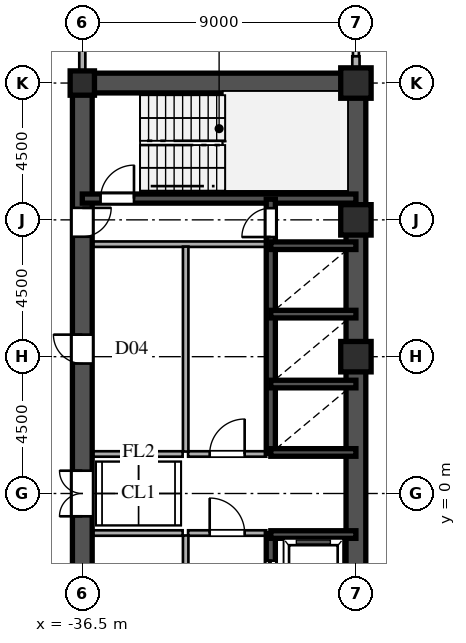
"""IFC4 building model, lengths in metres.
Left out: names, types, materials, properties, quantities, classifications, styles, units other than length and angle.
Written with IfcOpenShell. Run it as: python <this file> out.ifc"""

import sys

from ifc_helpers import new_model, si_unit, direction, frame, frame_2d, origin, origin_2d, place, context, subcontext, project, spatial, rectangle, hollow_rectangle, i_section, extrude, source, transform, mapped, element, fill, save


model = new_model("IFC4")
c1 = context("Model", 3, precision=1e-05, world=origin(), true_north=direction((0.0, 1.0)))
c2 = subcontext(c1, "Body", "Model", "MODEL_VIEW")
j1 = project(units=[si_unit("LENGTHUNIT", "METRE"), si_unit("PLANEANGLEUNIT", "RADIAN")], contexts=[c1])
p1 = place(None, origin())
s1 = spatial("IfcSite", under=j1, at=p1, CompositionType="ELEMENT")
p2 = place(p1, origin())
s2 = spatial("IfcBuilding", under=s1, at=p2, CompositionType="ELEMENT")
p3 = place(p2, frame((0.0, 0.0, 65.7)))
s3 = spatial("IfcBuildingStorey", under=s2, at=p3, CompositionType="ELEMENT", Elevation=65.7)
m1 = source(origin(), c2, "Body", "SweptSolid", [
    extrude(hollow_rectangle(XDim=1.0, YDim=1.0, WallThickness=0.042, at=origin_2d()), origin(), (0.0, 0.0, 1.0), 3.6),
])
for number, where, z_axis, x_axis in (
    (1, (-27.5, 4.5, 0.0), (0.0, 0.0, 1.0), (1.0, 0.0, 0.0)),
    (2, (-27.5, 9.0, 0.0), (0.0, 0.0, 1.0), (1.0, 0.0, 0.0)),
    (3, (-27.5, 13.5, 0.0), (0.0, 0.0, 1.0), (1.0, 0.0, 0.0)),
):
    element("IfcColumn", number, at=place(p3, frame(where, z_axis=z_axis, x_axis=x_axis)), inside=s3, PredefinedType="COLUMN", context=c2, shape_type="MappedRepresentation", body=[
        mapped(m1, transform((0.0, 0.0, 0.0), scale=1.0)),
    ])
m2 = source(origin(), c2, "Body", "SweptSolid", [
    extrude(i_section(OverallWidth=0.8, OverallDepth=0.8, WebThickness=0.032, FlangeThickness=0.05, at=origin_2d()), origin(), (0.0, 0.0, 1.0), 3.6),
])
p4 = place(p3, frame((-36.5, 13.5, 0.0), z_axis=(0.0, 0.0, 1.0), x_axis=(1.0, 0.0, 0.0)))
e4 = element("IfcColumn", 4, at=p4, inside=s3, PredefinedType="COLUMN", context=c2, shape_type="MappedRepresentation", body=[
    mapped(m2, transform((0.0, 0.0, 0.0), scale=1.0)),
])
p5 = place(p3, frame((-27.5, 13.83, 0.0), z_axis=(0.0, 0.0, 1.0), x_axis=(0.0, 1.0, 0.0)))
e5 = element("IfcWall", 5, at=p5, inside=s3, PredefinedType="SOLIDWALL", context=c2, shape_type="SweptSolid", body=[
    extrude(rectangle(XDim=0.55, YDim=0.24, at=frame_2d((0.275, 0.0))), origin(), (0.0, 0.0, 1.0), 2.88),
])
for number, where, z_axis, x_axis in (
    (6, (-27.5, -13.5, 0.0), (0.0, 0.0, 1.0), (0.0, 1.0, 0.0)),
    (7, (-27.5, 1.3, 0.0), (0.0, 0.0, 1.0), (0.0, 1.0, 0.0)),
):
    element("IfcWall", number, at=place(p3, frame(where, z_axis=z_axis, x_axis=x_axis)), inside=s3, PredefinedType="SHEAR", context=c2, shape_type="SweptSolid", body=[
        extrude(rectangle(XDim=12.2, YDim=0.65, at=frame_2d((6.1, 0.0))), origin(), (0.0, 0.0, 1.0), 3.38),
    ])
p6 = place(p3, frame((-27.5, -1.3, 0.0), z_axis=(0.0, 0.0, 1.0), x_axis=(0.0, 1.0, 0.0)))
e8 = element("IfcWall", 8, at=p6, inside=s3, PredefinedType="SHEAR", context=c2, shape_type="SweptSolid", body=[
    extrude(rectangle(XDim=2.6, YDim=0.65, at=frame_2d((1.3, 0.0))), origin(), (0.0, 0.0, 1.0), 3.38),
])
p7 = place(p3, frame((-36.5, 13.5, 0.0), z_axis=(0.0, 0.0, 1.0), x_axis=(1.0, 0.0, 0.0)))
e9 = element("IfcWall", 9, at=p7, inside=s3, PredefinedType="SHEAR", context=c2, shape_type="SweptSolid", body=[
    extrude(rectangle(XDim=9.0, YDim=0.65, at=frame_2d((4.5, 0.0))), origin(), (0.0, 0.0, 1.0), 3.38),
])
p8 = place(p3, frame((-36.5, -1.3, 0.0), z_axis=(0.0, 0.0, 1.0), x_axis=(0.0, 1.0, 0.0)))
e10 = element("IfcWall", 10, at=p8, inside=s3, PredefinedType="SHEAR", context=c2, shape_type="SweptSolid", body=[
    extrude(rectangle(XDim=2.6, YDim=0.65, at=frame_2d((1.3, 0.0))), origin(), (0.0, 0.0, 1.0), 3.38),
])
p9 = place(p8, frame((0.55, 0.0, 0.0)))
e11 = element("IfcOpeningElement", 11, at=p9, cuts=e10, PredefinedType="OPENING", context=c2, shape_type="SweptSolid", body=[
    extrude(rectangle(XDim=1.5, YDim=2.3, at=frame_2d((0.75, 1.15))), frame((0.0, 0.335, 0.0), z_axis=(0.0, -1.0, 0.0), x_axis=(1.0, 0.0, 0.0)), (0.0, 0.0, 1.0), 0.67),
])
p10 = place(p3, frame((-36.5, 8.2, 0.0), z_axis=(0.0, 0.0, 1.0), x_axis=(0.0, 1.0, 0.0)))
e12 = element("IfcWall", 12, at=p10, inside=s3, PredefinedType="SHEAR", context=c2, shape_type="SweptSolid", body=[
    extrude(rectangle(XDim=5.45, YDim=0.65, at=frame_2d((2.725, 0.0))), origin(), (0.0, 0.0, 1.0), 3.38),
])
p11 = place(p10, frame((0.245, 0.0, 0.0)))
e13 = element("IfcOpeningElement", 13, at=p11, cuts=e12, PredefinedType="OPENING", context=c2, shape_type="SweptSolid", body=[
    extrude(rectangle(XDim=0.95, YDim=2.15, at=frame_2d((0.475, 1.075))), frame((0.0, 0.335, 0.0), z_axis=(0.0, -1.0, 0.0), x_axis=(1.0, 0.0, 0.0)), (0.0, 0.0, 1.0), 0.67),
])
p12 = place(p3, frame((-36.5, -6.5, 0.0), z_axis=(0.0, 0.0, 1.0), x_axis=(0.0, 1.0, 0.0)))
e14 = element("IfcWall", 14, at=p12, inside=s3, PredefinedType="SHEAR", context=c2, shape_type="SweptSolid", body=[
    extrude(rectangle(XDim=5.2, YDim=0.65, at=frame_2d((2.6, 0.0))), origin(), (0.0, 0.0, 1.0), 3.38),
])
p13 = place(p12, frame((2.125, 0.0, 0.0)))
e15 = element("IfcOpeningElement", 15, at=p13, cuts=e14, PredefinedType="OPENING", context=c2, shape_type="SweptSolid", body=[
    extrude(rectangle(XDim=0.95, YDim=2.15, at=frame_2d((0.475, 1.075))), frame((0.0, 0.335, 0.0), z_axis=(0.0, -1.0, 0.0), x_axis=(1.0, 0.0, 0.0)), (0.0, 0.0, 1.0), 0.67),
])
p14 = place(p3, frame((-36.5, 1.3, 0.0), z_axis=(0.0, 0.0, 1.0), x_axis=(0.0, 1.0, 0.0)))
e16 = element("IfcWall", 16, at=p14, inside=s3, PredefinedType="SHEAR", context=c2, shape_type="SweptSolid", body=[
    extrude(rectangle(XDim=6.9, YDim=0.65, at=frame_2d((3.45, 0.0))), origin(), (0.0, 0.0, 1.0), 3.38),
])
p15 = place(p14, frame((2.975, 0.0, 0.0)))
e17 = element("IfcOpeningElement", 17, at=p15, cuts=e16, PredefinedType="OPENING", context=c2, shape_type="SweptSolid", body=[
    extrude(rectangle(XDim=0.95, YDim=2.15, at=frame_2d((0.475, 1.075))), frame((0.0, 0.335, 0.0), z_axis=(0.0, -1.0, 0.0), x_axis=(1.0, 0.0, 0.0)), (0.0, 0.0, 1.0), 0.67),
])
p16 = place(p3, frame((-36.5, 9.7, 0.0), z_axis=(0.0, 0.0, 1.0), x_axis=(1.0, 0.0, 0.0)))
e18 = element("IfcWall", 18, at=p16, inside=s3, PredefinedType="SHEAR", context=c2, shape_type="SweptSolid", body=[
    extrude(rectangle(XDim=9.0, YDim=0.3, at=frame_2d((4.5, 0.0))), origin(), (0.0, 0.0, 1.0), 3.38),
])
p17 = place(p16, frame((0.6, 0.0, 0.0)))
e19 = element("IfcOpeningElement", 19, at=p17, cuts=e18, PredefinedType="OPENING", context=c2, shape_type="SweptSolid", body=[
    extrude(rectangle(XDim=1.1, YDim=2.2, at=frame_2d((0.55, 1.1))), frame((0.0, 0.16, 0.0), z_axis=(0.0, -1.0, 0.0), x_axis=(1.0, 0.0, 0.0)), (0.0, 0.0, 1.0), 0.32),
])
for number, where, z_axis, x_axis in (
    (20, (-30.3, -1.35, 0.0), (0.0, 0.0, 1.0), (1.0, 0.0, 0.0)),
    (21, (-30.3, 1.35, 0.0), (0.0, 0.0, 1.0), (1.0, 0.0, 0.0)),
    (22, (-30.3, 3.6, 0.0), (0.0, 0.0, 1.0), (1.0, 0.0, 0.0)),
    (23, (-30.3, 5.9, 0.0), (0.0, 0.0, 1.0), (1.0, 0.0, 0.0)),
    (24, (-30.3, 8.15, 0.0), (0.0, 0.0, 1.0), (1.0, 0.0, 0.0)),
):
    element("IfcWall", number, at=place(p3, frame(where, z_axis=z_axis, x_axis=x_axis)), inside=s3, PredefinedType="SHEAR", context=c2, shape_type="SweptSolid", body=[
        extrude(rectangle(XDim=2.8, YDim=0.25, at=frame_2d((1.4, 0.0))), origin(), (0.0, 0.0, 1.0), 3.38),
    ])
p18 = place(p3, frame((-30.3, -4.2, 0.0), z_axis=(0.0, 0.0, 1.0), x_axis=(0.0, 1.0, 0.0)))
e25 = element("IfcWall", 25, at=p18, inside=s3, PredefinedType="SHEAR", context=c2, shape_type="SweptSolid", body=[
    extrude(rectangle(XDim=2.88, YDim=0.3, at=frame_2d((1.44, 0.0))), origin(), (0.0, 0.0, 1.0), 3.38),
])
p19 = place(p18, frame((0.89, 0.0, 0.0)))
e26 = element("IfcOpeningElement", 26, at=p19, cuts=e25, PredefinedType="OPENING", context=c2, shape_type="SweptSolid", body=[
    extrude(rectangle(XDim=1.1, YDim=2.2, at=frame_2d((0.55, 1.1))), frame((0.0, 0.16, 0.0), z_axis=(0.0, -1.0, 0.0), x_axis=(1.0, 0.0, 0.0)), (0.0, 0.0, 1.0), 0.32),
])
p20 = place(p3, frame((-30.3, 1.32, 0.0), z_axis=(0.0, 0.0, 1.0), x_axis=(0.0, 1.0, 0.0)))
e27 = element("IfcWall", 27, at=p20, inside=s3, PredefinedType="SHEAR", context=c2, shape_type="SweptSolid", body=[
    extrude(rectangle(XDim=2.28, YDim=0.3, at=frame_2d((1.14, 0.0))), origin(), (0.0, 0.0, 1.0), 3.38),
])
p21 = place(p3, frame((-30.3, 3.6, 0.0), z_axis=(0.0, 0.0, 1.0), x_axis=(0.0, 1.0, 0.0)))
e28 = element("IfcWall", 28, at=p21, inside=s3, PredefinedType="SHEAR", context=c2, shape_type="SweptSolid", body=[
    extrude(rectangle(XDim=2.3, YDim=0.3, at=frame_2d((1.15, 0.0))), origin(), (0.0, 0.0, 1.0), 3.38),
])
p22 = place(p3, frame((-30.3, 5.9, 0.0), z_axis=(0.0, 0.0, 1.0), x_axis=(0.0, 1.0, 0.0)))
e29 = element("IfcWall", 29, at=p22, inside=s3, PredefinedType="SHEAR", context=c2, shape_type="SweptSolid", body=[
    extrude(rectangle(XDim=2.25, YDim=0.3, at=frame_2d((1.125, 0.0))), origin(), (0.0, 0.0, 1.0), 3.38),
])
p23 = place(p3, frame((-30.3, 8.15, 0.0), z_axis=(0.0, 0.0, 1.0), x_axis=(0.0, 1.0, 0.0)))
e30 = element("IfcWall", 30, at=p23, inside=s3, PredefinedType="SHEAR", context=c2, shape_type="SweptSolid", body=[
    extrude(rectangle(XDim=1.53, YDim=0.3, at=frame_2d((0.765, 0.0))), origin(), (0.0, 0.0, 1.0), 3.38),
])
p24 = place(p23, frame((0.285, 0.0, 0.0)))
e31 = element("IfcOpeningElement", 31, at=p24, cuts=e30, PredefinedType="OPENING", context=c2, shape_type="SweptSolid", body=[
    extrude(rectangle(XDim=0.95, YDim=2.15, at=frame_2d((0.475, 1.075))), frame((0.0, 0.16, 0.0), z_axis=(0.0, -1.0, 0.0), x_axis=(1.0, 0.0, 0.0)), (0.0, 0.0, 1.0), 0.32),
])
p25 = place(p3, frame((-36.15, 8.2, 0.0), z_axis=(0.0, 0.0, 1.0), x_axis=(1.0, 0.0, 0.0)))
e32 = element("IfcWall", 32, at=p25, inside=s3, PredefinedType="PARTITIONING", context=c2, shape_type="SweptSolid", body=[
    extrude(rectangle(XDim=5.7, YDim=0.18, at=frame_2d((2.85, 0.0))), origin(), (0.0, 0.0, 1.0), 3.38),
])
p26 = place(p3, frame((-33.1, -6.42, 0.0), z_axis=(0.0, 0.0, 1.0), x_axis=(0.0, 1.0, 0.0)))
e33 = element("IfcWall", 33, at=p26, inside=s3, PredefinedType="PARTITIONING", context=c2, shape_type="SweptSolid", body=[
    extrude(rectangle(XDim=5.04, YDim=0.18, at=frame_2d((2.52, 0.0))), origin(), (0.0, 0.0, 1.0), 3.38),
])
p27 = place(p3, frame((-33.1, 1.38, 0.0), z_axis=(0.0, 0.0, 1.0), x_axis=(0.0, 1.0, 0.0)))
e34 = element("IfcWall", 34, at=p27, inside=s3, PredefinedType="PARTITIONING", context=c2, shape_type="SweptSolid", body=[
    extrude(rectangle(XDim=6.74, YDim=0.18, at=frame_2d((3.37, 0.0))), origin(), (0.0, 0.0, 1.0), 3.38),
])
p28 = place(p3, frame((-33.02, -1.3, 0.0), z_axis=(0.0, 0.0, 1.0), x_axis=(1.0, 0.0, 0.0)))
e35 = element("IfcWall", 35, at=p28, inside=s3, PredefinedType="PARTITIONING", context=c2, shape_type="SweptSolid", body=[
    extrude(rectangle(XDim=2.57, YDim=0.18, at=frame_2d((1.285, 0.0))), origin(), (0.0, 0.0, 1.0), 3.38),
])
p29 = place(p28, frame((0.71, 0.0, 0.0)))
e36 = element("IfcOpeningElement", 36, at=p29, cuts=e35, PredefinedType="OPENING", context=c2, shape_type="SweptSolid", body=[
    extrude(rectangle(XDim=1.15, YDim=2.2, at=frame_2d((0.575, 1.1))), frame((0.0, 0.1, 0.0), z_axis=(0.0, -1.0, 0.0), x_axis=(1.0, 0.0, 0.0)), (0.0, 0.0, 1.0), 0.2),
])
p30 = place(p3, frame((-33.02, 1.3, 0.0), z_axis=(0.0, 0.0, 1.0), x_axis=(1.0, 0.0, 0.0)))
e37 = element("IfcWall", 37, at=p30, inside=s3, PredefinedType="PARTITIONING", context=c2, shape_type="SweptSolid", body=[
    extrude(rectangle(XDim=2.57, YDim=0.18, at=frame_2d((1.285, 0.0))), origin(), (0.0, 0.0, 1.0), 3.38),
])
p31 = place(p30, frame((0.71, 0.0, 0.0)))
e38 = element("IfcOpeningElement", 38, at=p31, cuts=e37, PredefinedType="OPENING", context=c2, shape_type="SweptSolid", body=[
    extrude(rectangle(XDim=1.15, YDim=2.2, at=frame_2d((0.575, 1.1))), frame((0.0, 0.1, 0.0), z_axis=(0.0, -1.0, 0.0), x_axis=(1.0, 0.0, 0.0)), (0.0, 0.0, 1.0), 0.2),
])
for number, where, z_axis, x_axis in (
    (39, (-36.15, -1.3, 0.0), (0.0, 0.0, 1.0), (1.0, 0.0, 0.0)),
    (40, (-36.15, 1.3, 0.0), (0.0, 0.0, 1.0), (1.0, 0.0, 0.0)),
):
    element("IfcWall", number, at=place(p3, frame(where, z_axis=z_axis, x_axis=x_axis)), inside=s3, PredefinedType="PARTITIONING", context=c2, shape_type="SweptSolid", body=[
        extrude(rectangle(XDim=2.95, YDim=0.18, at=frame_2d((1.475, 0.0))), origin(), (0.0, 0.0, 1.0), 3.38),
    ])
p32 = place(p3, frame((-36.5, 13.83, 0.0), z_axis=(0.0, 0.0, 1.0), x_axis=(0.0, 1.0, 0.0)))
e41 = element("IfcWall", 41, at=p32, inside=s3, PredefinedType="PARTITIONING", context=c2, shape_type="SweptSolid", body=[
    extrude(rectangle(XDim=1.685, YDim=0.2, at=frame_2d((0.842, 0.0))), origin(), (0.0, 0.0, 1.0), 2.68),
])
m3 = source(origin(), c2, "Body", "SweptSolid", [
    extrude(rectangle(XDim=1.5, YDim=2.3, at=frame_2d((0.75, 1.15))), frame((0.0, 0.025, 0.0), z_axis=(0.0, -1.0, 0.0), x_axis=(1.0, 0.0, 0.0)), (0.0, 0.0, 1.0), 0.05),
])
p33 = place(p9, origin())
e42 = element("IfcDoor", 42, at=p33, inside=s3, OperationType="DOUBLE_SWING_LEFT", PredefinedType="DOOR", context=c2, shape_type="MappedRepresentation", body=[
    mapped(m3, transform((0.0, 0.0, 0.0), scale=1.0)),
])
fill(e11, e42)
m4 = source(origin(), c2, "Body", "SweptSolid", [
    extrude(rectangle(XDim=0.95, YDim=2.15, at=frame_2d((0.475, 1.075))), frame((0.0, 0.025, 0.0), z_axis=(0.0, -1.0, 0.0), x_axis=(1.0, 0.0, 0.0)), (0.0, 0.0, 1.0), 0.05),
])
p34 = place(p11, frame((0.95, 0.0, 0.0), z_axis=(0.0, 0.0, 1.0), x_axis=(-1.0, 0.0, 0.0)))
e43 = element("IfcDoor", 43, at=p34, inside=s3, OperationType="SINGLE_SWING_RIGHT", PredefinedType="DOOR", context=c2, shape_type="MappedRepresentation", body=[
    mapped(m4, transform((0.0, 0.0, 0.0), scale=1.0)),
])
fill(e13, e43)
p35 = place(p15, origin())
e44 = element("IfcDoor", 44, at=p35, inside=s3, OperationType="SINGLE_SWING_RIGHT", PredefinedType="DOOR", context=c2, shape_type="MappedRepresentation", body=[
    mapped(m4, transform((0.0, 0.0, 0.0), scale=1.0)),
])
fill(e17, e44)
m5 = source(origin(), c2, "Body", "SweptSolid", [
    extrude(rectangle(XDim=1.1, YDim=2.2, at=frame_2d((0.55, 1.1))), frame((0.0, 0.025, 0.0), z_axis=(0.0, -1.0, 0.0), x_axis=(1.0, 0.0, 0.0)), (0.0, 0.0, 1.0), 0.05),
])
p36 = place(p17, origin())
e45 = element("IfcDoor", 45, at=p36, inside=s3, OperationType="SINGLE_SWING_RIGHT", PredefinedType="DOOR", context=c2, shape_type="MappedRepresentation", body=[
    mapped(m5, transform((0.0, 0.0, 0.0), scale=1.0)),
])
fill(e19, e45)
m6 = source(origin(), c2, "Body", "SweptSolid", [
    extrude(rectangle(XDim=1.1, YDim=2.2, at=frame_2d((0.55, 1.1))), frame((0.0, 0.025, 0.0), z_axis=(0.0, -1.0, 0.0), x_axis=(1.0, 0.0, 0.0)), (0.0, 0.0, 1.0), 0.05),
])
p37 = place(p19, origin())
e46 = element("IfcDoor", 46, at=p37, inside=s3, OperationType="DOUBLE_DOOR_SLIDING", PredefinedType="DOOR", context=c2, shape_type="MappedRepresentation", body=[
    mapped(m6, transform((0.0, 0.0, 0.0), scale=1.0)),
])
fill(e26, e46)
p38 = place(p24, origin())
e47 = element("IfcDoor", 47, at=p38, inside=s3, OperationType="SINGLE_SWING_LEFT", PredefinedType="DOOR", context=c2, shape_type="MappedRepresentation", body=[
    mapped(m4, transform((0.0, 0.0, 0.0), scale=1.0)),
])
fill(e31, e47)
m7 = source(origin(), c2, "Body", "SweptSolid", [
    extrude(rectangle(XDim=1.15, YDim=2.2, at=frame_2d((0.575, 1.1))), frame((0.0, 0.025, 0.0), z_axis=(0.0, -1.0, 0.0), x_axis=(1.0, 0.0, 0.0)), (0.0, 0.0, 1.0), 0.05),
])
p39 = place(p29, origin())
e48 = element("IfcDoor", 48, at=p39, inside=s3, OperationType="SINGLE_SWING_LEFT", PredefinedType="DOOR", context=c2, shape_type="MappedRepresentation", body=[
    mapped(m7, transform((0.0, 0.0, 0.0), scale=1.0)),
])
fill(e36, e48)
p40 = place(p31, origin())
e49 = element("IfcDoor", 49, at=p40, inside=s3, OperationType="SINGLE_SWING_RIGHT", PredefinedType="DOOR", context=c2, shape_type="MappedRepresentation", body=[
    mapped(m7, transform((0.0, 0.0, 0.0), scale=1.0)),
])
fill(e38, e49)
save(model, sys.argv[1])
